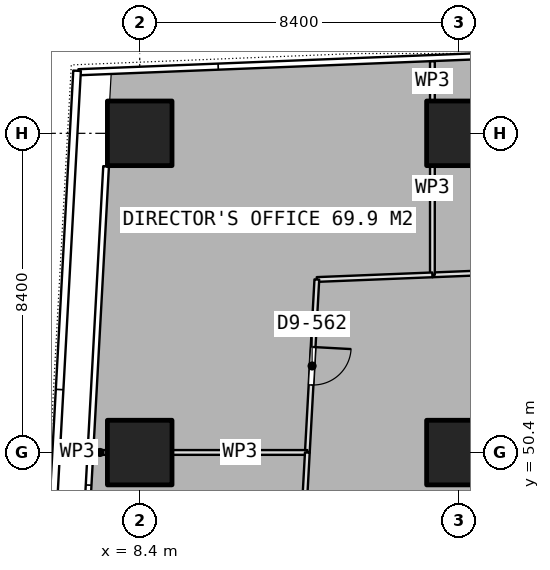
"""IFC4 building model, lengths in metres.
Left out: names, types, materials, properties, quantities, classifications, styles, units other than length and angle.
Written with IfcOpenShell. Run it as: python <this file> out.ifc"""

import sys

from ifc_helpers import new_model, si_unit, direction, frame, frame_2d, origin, origin_2d, place, context, subcontext, project, spatial, rectangle, extrude, element, fill, save


model = new_model("IFC4")
c1 = context("Model", 3, precision=1e-05, world=origin(), true_north=direction((0.0, 1.0)))
c2 = subcontext(c1, "Body", "Model", "MODEL_VIEW")
j1 = project(units=[si_unit("LENGTHUNIT", "METRE"), si_unit("PLANEANGLEUNIT", "RADIAN")], contexts=[c1])
p1 = place(None, origin())
s1 = spatial("IfcSite", under=j1, at=p1, CompositionType="ELEMENT")
p2 = place(p1, origin())
s2 = spatial("IfcBuilding", under=s1, at=p2, CompositionType="ELEMENT")
p3 = place(p2, frame((0.0, 0.0, 140.3)))
s3 = spatial("IfcBuildingStorey", under=s2, at=p3, CompositionType="ELEMENT", Elevation=140.3)
for number, where, z_axis, x_axis in (
    (1, (8.4, 50.4, 0.0), (0.0, 0.0, 1.0), (1.0, 0.0, 0.0)),
    (2, (8.4, 58.8, 0.0), (0.0, 0.0, 1.0), (1.0, 0.0, 0.0)),
    (3, (16.8, 50.4, 0.0), (0.0, 0.0, 1.0), (1.0, 0.0, 0.0)),
    (4, (16.8, 58.8, 0.0), (0.0, 0.0, 1.0), (1.0, 0.0, 0.0)),
):
    element("IfcColumn", number, at=place(p3, frame(where, z_axis=z_axis, x_axis=x_axis)), inside=s3, PredefinedType="COLUMN", context=c2, shape_type="SweptSolid", body=[
        extrude(rectangle(XDim=1.7, YDim=1.7, at=origin_2d()), origin(), (0.0, 0.0, 1.0), 3.75),
    ])
p4 = place(p3, frame((25.413, 55.449, 0.0), z_axis=(0.0, 0.0, 1.0), x_axis=(-0.999198361773, -0.04003290935, 0.0)))
e5 = element("IfcWall", 5, at=p4, inside=s3, PredefinedType="PARTITIONING", context=c2, shape_type="SweptSolid", body=[
    extrude(rectangle(XDim=9.319, YDim=0.125, at=frame_2d((4.659, 0.0))), origin(), (0.0, 0.0, 1.0), 3.5),
])
p5 = place(p4, frame((4.159, 0.0, 0.0)))
e6 = element("IfcOpeningElement", 6, at=p5, cuts=e5, PredefinedType="OPENING", context=c2, shape_type="SweptSolid", body=[
    extrude(rectangle(XDim=1.0, YDim=2.1, at=frame_2d((0.5, 1.05))), frame((0.0, 0.073, 0.0), z_axis=(0.0, -1.0, 0.0), x_axis=(1.0, 0.0, 0.0)), (0.0, 0.0, 1.0), 0.145),
])
p6 = place(p3, frame((16.102, 55.076, 0.0), z_axis=(0.0, 0.0, 1.0), x_axis=(0.0, 1.0, 0.0)))
e7 = element("IfcWall", 7, at=p6, inside=s3, PredefinedType="PARTITIONING", context=c2, shape_type="SweptSolid", body=[
    extrude(rectangle(XDim=2.854, YDim=0.125, at=frame_2d((1.427, 0.0))), origin(), (0.0, 0.0, 1.0), 3.5),
])
p7 = place(p3, frame((16.102, 59.67, 0.0), z_axis=(0.0, 0.0, 1.0), x_axis=(0.0, 1.0, 0.0)))
e8 = element("IfcWall", 8, at=p7, inside=s3, PredefinedType="PARTITIONING", context=c2, shape_type="SweptSolid", body=[
    extrude(rectangle(XDim=1.03, YDim=0.125, at=frame_2d((0.515, 0.0))), origin(), (0.0, 0.0, 1.0), 3.5),
])
p8 = place(p3, frame((16.101, 55.076, 0.0), z_axis=(0.0, 0.0, 1.0), x_axis=(-0.999198007742, -0.040041744769, 0.0)))
e9 = element("IfcWall", 9, at=p8, inside=s3, PredefinedType="PARTITIONING", context=c2, shape_type="SweptSolid", body=[
    extrude(rectangle(XDim=3.042, YDim=0.125, at=frame_2d((1.521, 0.0))), origin(), (0.0, 0.0, 1.0), 3.5),
])
p9 = place(p3, frame((13.061, 54.954, 0.0), z_axis=(0.0, 0.0, 1.0), x_axis=(-0.054849980007, -0.998494606742, 0.0)))
e10 = element("IfcWall", 10, at=p9, inside=s3, PredefinedType="PARTITIONING", context=c2, shape_type="SweptSolid", body=[
    extrude(rectangle(XDim=4.558, YDim=0.125, at=frame_2d((2.279, 0.0))), origin(), (0.0, 0.0, 1.0), 3.5),
])
p10 = place(p9, frame((1.779, 0.0, 0.0)))
e11 = element("IfcOpeningElement", 11, at=p10, cuts=e10, PredefinedType="OPENING", context=c2, shape_type="SweptSolid", body=[
    extrude(rectangle(XDim=1.0, YDim=2.1, at=frame_2d((0.5, 1.05))), frame((0.0, 0.073, 0.0), z_axis=(0.0, -1.0, 0.0), x_axis=(1.0, 0.0, 0.0)), (0.0, 0.0, 1.0), 0.145),
])
p11 = place(p3, frame((12.811, 50.403, 0.0), z_axis=(0.0, 0.0, 1.0), x_axis=(-1.0, 0.0, 0.0)))
e12 = element("IfcWall", 12, at=p11, inside=s3, PredefinedType="PARTITIONING", context=c2, shape_type="SweptSolid", body=[
    extrude(rectangle(XDim=3.541, YDim=0.125, at=frame_2d((1.771, 0.0))), origin(), (0.0, 0.0, 1.0), 3.5),
])
p12 = place(p3, frame((7.53, 50.403, 0.0), z_axis=(0.0, 0.0, 1.0), x_axis=(-1.0, 0.0, 0.0)))
e13 = element("IfcWall", 13, at=p12, inside=s3, PredefinedType="PARTITIONING", context=c2, shape_type="SweptSolid", body=[
    extrude(rectangle(XDim=0.347, YDim=0.125, at=frame_2d((0.173, 0.0))), origin(), (0.0, 0.0, 1.0), 3.5),
])
p13 = place(p3, frame((12.811, 50.402, 0.0), z_axis=(0.0, 0.0, 1.0), x_axis=(-0.054783199126, -0.998498272955, 0.0)))
e14 = element("IfcWall", 14, at=p13, inside=s3, PredefinedType="PARTITIONING", context=c2, shape_type="SweptSolid", body=[
    extrude(rectangle(XDim=7.54, YDim=0.125, at=frame_2d((3.77, 0.0))), origin(), (0.0, 0.0, 1.0), 3.5),
])
p14 = place(p13, frame((2.87, 0.0, 0.0)))
e15 = element("IfcOpeningElement", 15, at=p14, cuts=e14, PredefinedType="OPENING", context=c2, shape_type="SweptSolid", body=[
    extrude(rectangle(XDim=1.8, YDim=2.1, at=frame_2d((0.9, 1.05))), frame((0.0, 0.073, 0.0), z_axis=(0.0, -1.0, 0.0), x_axis=(1.0, 0.0, 0.0)), (0.0, 0.0, 1.0), 0.145),
])
p15 = place(p10, origin())
e16 = element("IfcDoor", 16, at=p15, inside=s3, OperationType="SINGLE_SWING_LEFT", PredefinedType="DOOR", context=c2, shape_type="SweptSolid", body=[
    extrude(rectangle(XDim=1.0, YDim=2.1, at=frame_2d((0.5, 1.05))), frame((0.0, 0.025, 0.0), z_axis=(0.0, -1.0, 0.0), x_axis=(1.0, 0.0, 0.0)), (0.0, 0.0, 1.0), 0.05),
])
fill(e11, e16)
save(model, sys.argv[1])
